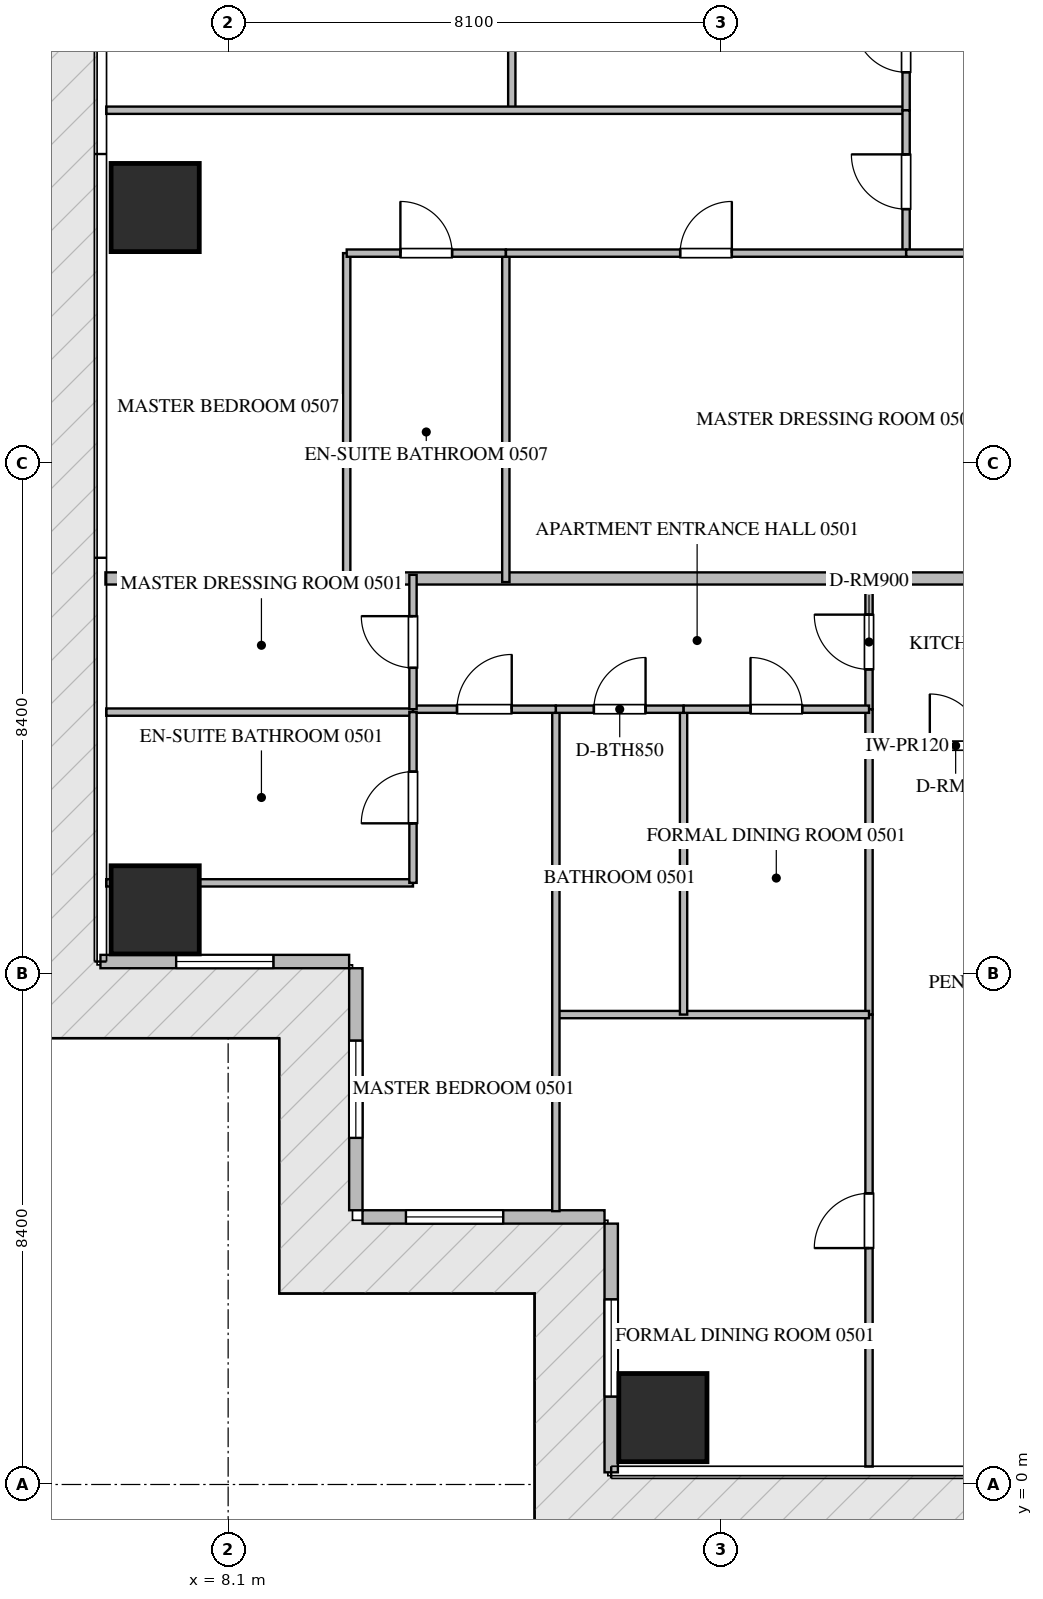
"""IFC4 building model, lengths in metres.
Left out: names, types, materials, properties, quantities, classifications, styles, units other than length and angle.
Written with IfcOpenShell. Run it as: python <this file> out.ifc"""

import sys

from ifc_helpers import new_model, si_unit, direction, frame, frame_2d, origin, origin_2d, place, context, subcontext, project, spatial, rectangle, extrude, source, transform, mapped, element, fill, save


model = new_model("IFC4")
c1 = context("Model", 3, precision=1e-05, world=origin(), true_north=direction((0.0, 1.0)))
c2 = subcontext(c1, "Body", "Model", "MODEL_VIEW")
j1 = project(units=[si_unit("LENGTHUNIT", "METRE"), si_unit("PLANEANGLEUNIT", "RADIAN")], contexts=[c1])
p1 = place(None, origin())
s1 = spatial("IfcSite", under=j1, at=p1, CompositionType="ELEMENT")
p2 = place(p1, origin())
s2 = spatial("IfcBuilding", under=s1, at=p2, CompositionType="ELEMENT")
p3 = place(p2, frame((0.0, 0.0, 26.7)))
s3 = spatial("IfcBuildingStorey", under=s2, at=p3, CompositionType="ELEMENT", Elevation=26.7)
m1 = source(origin(), c2, "Body", "SweptSolid", [
    extrude(rectangle(XDim=1.45, YDim=1.45, at=origin_2d()), origin(), (0.0, 0.0, 1.0), 3.93),
])
for number, where, z_axis, x_axis in (
    (1, (15.25, 1.1, -0.44), (0.0, 0.0, 1.0), (1.0, 0.0, 0.0)),
    (2, (6.9, 9.45, -0.44), (0.0, 0.0, 1.0), (1.0, 0.0, 0.0)),
    (3, (6.9, 21.0, -0.44), (0.0, 0.0, 1.0), (1.0, 0.0, 0.0)),
):
    element("IfcColumn", number, at=place(p3, frame(where, z_axis=z_axis, x_axis=x_axis)), inside=s3, PredefinedType="COLUMN", context=c2, shape_type="MappedRepresentation", body=[
        mapped(m1, transform((0.0, 0.0, 0.0), scale=1.0)),
    ])
p4 = place(p3, frame((6.0, 8.6, 0.0), z_axis=(0.0, 0.0, 1.0), x_axis=(1.0, 0.0, 0.0)))
e4 = element("IfcWall", 4, at=p4, inside=s3, PredefinedType="ELEMENTEDWALL", context=c2, shape_type="SweptSolid", body=[
    extrude(rectangle(XDim=4.09, YDim=0.22, at=frame_2d((2.045, 0.0))), origin(), (0.0, 0.0, 1.0), 3.475),
])
p5 = place(p4, frame((1.245, 0.0, 0.65)))
e5 = element("IfcOpeningElement", 5, at=p5, cuts=e4, PredefinedType="OPENING", context=c2, shape_type="SweptSolid", body=[
    extrude(rectangle(XDim=1.6, YDim=2.1, at=frame_2d((0.8, 1.05))), frame((0.0, 0.12, 0.0), z_axis=(0.0, -1.0, 0.0), x_axis=(1.0, 0.0, 0.0)), (0.0, 0.0, 1.0), 0.24),
])
p6 = place(p3, frame((10.2, 8.49, 0.0), z_axis=(0.0, 0.0, 1.0), x_axis=(0.0, -1.0, 0.0)))
e6 = element("IfcWall", 6, at=p6, inside=s3, PredefinedType="ELEMENTEDWALL", context=c2, shape_type="SweptSolid", body=[
    extrude(rectangle(XDim=3.98, YDim=0.22, at=frame_2d((1.99, 0.0))), origin(), (0.0, 0.0, 1.0), 3.475),
])
p7 = place(p6, frame((1.19, 0.0, 0.65)))
e7 = element("IfcOpeningElement", 7, at=p7, cuts=e6, PredefinedType="OPENING", context=c2, shape_type="SweptSolid", body=[
    extrude(rectangle(XDim=1.6, YDim=2.1, at=frame_2d((0.8, 1.05))), frame((0.0, 0.12, 0.0), z_axis=(0.0, -1.0, 0.0), x_axis=(1.0, 0.0, 0.0)), (0.0, 0.0, 1.0), 0.24),
])
p8 = place(p3, frame((10.31, 4.4, 0.0), z_axis=(0.0, 0.0, 1.0), x_axis=(1.0, 0.0, 0.0)))
e8 = element("IfcWall", 8, at=p8, inside=s3, PredefinedType="ELEMENTEDWALL", context=c2, shape_type="SweptSolid", body=[
    extrude(rectangle(XDim=3.98, YDim=0.22, at=frame_2d((1.99, 0.0))), origin(), (0.0, 0.0, 1.0), 3.475),
])
p9 = place(p8, frame((0.714, 0.0, 0.65)))
e9 = element("IfcOpeningElement", 9, at=p9, cuts=e8, PredefinedType="OPENING", context=c2, shape_type="SweptSolid", body=[
    extrude(rectangle(XDim=1.6, YDim=2.1, at=frame_2d((0.8, 1.05))), frame((0.0, 0.12, 0.0), z_axis=(0.0, -1.0, 0.0), x_axis=(1.0, 0.0, 0.0)), (0.0, 0.0, 1.0), 0.24),
])
p10 = place(p3, frame((14.4, 4.29, 0.0), z_axis=(0.0, 0.0, 1.0), x_axis=(0.0, -1.0, 0.0)))
e10 = element("IfcWall", 10, at=p10, inside=s3, PredefinedType="ELEMENTEDWALL", context=c2, shape_type="SweptSolid", body=[
    extrude(rectangle(XDim=4.09, YDim=0.22, at=frame_2d((2.045, 0.0))), origin(), (0.0, 0.0, 1.0), 3.475),
])
p11 = place(p10, frame((1.245, 0.0, 0.65)))
e11 = element("IfcOpeningElement", 11, at=p11, cuts=e10, PredefinedType="OPENING", context=c2, shape_type="SweptSolid", body=[
    extrude(rectangle(XDim=1.6, YDim=2.1, at=frame_2d((0.8, 1.05))), frame((0.0, 0.12, 0.0), z_axis=(0.0, -1.0, 0.0), x_axis=(1.0, 0.0, 0.0)), (0.0, 0.0, 1.0), 0.24),
])
p12 = place(p3, frame((6.082, 14.9, 0.0), z_axis=(0.0, 0.0, 1.0), x_axis=(1.0, 0.0, 0.0)))
e12 = element("IfcWall", 12, at=p12, inside=s3, PredefinedType="PARTITIONING", context=c2, shape_type="SweptSolid", body=[
    extrude(rectangle(XDim=15.318, YDim=0.2, at=frame_2d((7.659, 0.0))), origin(), (0.0, 0.0, 1.0), 3.49),
])
p13 = place(p3, frame((18.64, 12.15, 0.0), z_axis=(0.0, 0.0, 1.0), x_axis=(1.0, 0.0, 0.0)))
e13 = element("IfcWall", 13, at=p13, inside=s3, PredefinedType="PARTITIONING", context=c2, shape_type="SweptSolid", body=[
    extrude(rectangle(XDim=2.85, YDim=0.12, at=frame_2d((1.425, 0.0))), origin(), (0.0, 0.0, 1.0), 3.49),
])
p14 = place(p13, frame((1.0, 0.0, 0.0)))
e14 = element("IfcOpeningElement", 14, at=p14, cuts=e13, PredefinedType="OPENING", context=c2, shape_type="SweptSolid", body=[
    extrude(rectangle(XDim=0.85, YDim=2.1, at=frame_2d((0.425, 1.05))), frame((0.0, 0.07, 0.0), z_axis=(0.0, -1.0, 0.0), x_axis=(1.0, 0.0, 0.0)), (0.0, 0.0, 1.0), 0.14),
])
p15 = place(p3, frame((18.64, 12.75, 0.0), z_axis=(0.0, 0.0, 1.0), x_axis=(0.0, 1.0, 0.0)))
e15 = element("IfcWall", 15, at=p15, inside=s3, PredefinedType="PARTITIONING", context=c2, shape_type="SweptSolid", body=[
    extrude(rectangle(XDim=2.21, YDim=0.12, at=frame_2d((1.105, 0.0))), origin(), (0.0, 0.0, 1.0), 3.49),
])
p16 = place(p15, frame((0.655, 0.0, 0.0)))
e16 = element("IfcOpeningElement", 16, at=p16, cuts=e15, PredefinedType="OPENING", context=c2, shape_type="SweptSolid", body=[
    extrude(rectangle(XDim=0.9, YDim=2.1, at=frame_2d((0.45, 1.05))), frame((0.0, 0.07, 0.0), z_axis=(0.0, -1.0, 0.0), x_axis=(1.0, 0.0, 0.0)), (0.0, 0.0, 1.0), 0.14),
])
p17 = place(p3, frame((18.64, 0.295, 0.0), z_axis=(0.0, 0.0, 1.0), x_axis=(0.0, 1.0, 0.0)))
e17 = element("IfcWall", 17, at=p17, inside=s3, PredefinedType="PARTITIONING", context=c2, shape_type="SweptSolid", body=[
    extrude(rectangle(XDim=7.433, YDim=0.12, at=frame_2d((3.717, 0.0))), origin(), (0.0, 0.0, 1.0), 3.49),
])
p18 = place(p17, frame((3.593, 0.0, 0.0)))
e18 = element("IfcOpeningElement", 18, at=p18, cuts=e17, PredefinedType="OPENING", context=c2, shape_type="SweptSolid", body=[
    extrude(rectangle(XDim=0.9, YDim=2.1, at=frame_2d((0.45, 1.05))), frame((0.0, 0.07, 0.0), z_axis=(0.0, -1.0, 0.0), x_axis=(1.0, 0.0, 0.0)), (0.0, 0.0, 1.0), 0.14),
])
p19 = place(p3, frame((18.64, 7.73, 0.0), z_axis=(0.0, 0.0, 1.0), x_axis=(0.0, 1.0, 0.0)))
e19 = element("IfcWall", 19, at=p19, inside=s3, PredefinedType="PARTITIONING", context=c2, shape_type="SweptSolid", body=[
    extrude(rectangle(XDim=5.018, YDim=0.12, at=frame_2d((2.509, 0.0))), origin(), (0.0, 0.0, 1.0), 3.49),
])
p20 = place(p3, frame((13.49, 7.728, 0.0), z_axis=(0.0, 0.0, 1.0), x_axis=(1.0, 0.0, 0.0)))
e20 = element("IfcWall", 20, at=p20, inside=s3, PredefinedType="PARTITIONING", context=c2, shape_type="SweptSolid", body=[
    extrude(rectangle(XDim=5.15, YDim=0.12, at=frame_2d((2.575, 0.0))), origin(), (0.0, 0.0, 1.0), 3.49),
])
p21 = place(p3, frame((13.49, 4.495, 0.0), z_axis=(0.0, 0.0, 1.0), x_axis=(0.0, 1.0, 0.0)))
e21 = element("IfcWall", 21, at=p21, inside=s3, PredefinedType="PARTITIONING", context=c2, shape_type="SweptSolid", body=[
    extrude(rectangle(XDim=8.255, YDim=0.12, at=frame_2d((4.127, 0.0))), origin(), (0.0, 0.0, 1.0), 3.49),
])
p22 = place(p3, frame((15.59, 7.728, 0.0), z_axis=(0.0, 0.0, 1.0), x_axis=(0.0, 1.0, 0.0)))
e22 = element("IfcWall", 22, at=p22, inside=s3, PredefinedType="PARTITIONING", context=c2, shape_type="SweptSolid", body=[
    extrude(rectangle(XDim=5.022, YDim=0.12, at=frame_2d((2.511, 0.0))), origin(), (0.0, 0.0, 1.0), 3.49),
])
p23 = place(p3, frame((13.49, 12.75, 0.0), z_axis=(0.0, 0.0, 1.0), x_axis=(1.0, 0.0, 0.0)))
e23 = element("IfcWall", 23, at=p23, inside=s3, PredefinedType="PARTITIONING", context=c2, shape_type="SweptSolid", body=[
    extrude(rectangle(XDim=2.1, YDim=0.12, at=frame_2d((1.05, 0.0))), origin(), (0.0, 0.0, 1.0), 3.49),
])
p24 = place(p23, frame((0.625, 0.0, 0.0)))
e24 = element("IfcOpeningElement", 24, at=p24, cuts=e23, PredefinedType="OPENING", context=c2, shape_type="SweptSolid", body=[
    extrude(rectangle(XDim=0.85, YDim=2.1, at=frame_2d((0.425, 1.05))), frame((0.0, 0.07, 0.0), z_axis=(0.0, -1.0, 0.0), x_axis=(1.0, 0.0, 0.0)), (0.0, 0.0, 1.0), 0.14),
])
p25 = place(p3, frame((15.592, 12.75, 0.0), z_axis=(0.0, 0.0, 1.0), x_axis=(1.0, 0.0, 0.0)))
e25 = element("IfcWall", 25, at=p25, inside=s3, PredefinedType="PARTITIONING", context=c2, shape_type="SweptSolid", body=[
    extrude(rectangle(XDim=3.048, YDim=0.12, at=frame_2d((1.524, 0.0))), origin(), (0.0, 0.0, 1.0), 3.49),
])
p26 = place(p25, frame((1.099, 0.0, 0.0)))
e26 = element("IfcOpeningElement", 26, at=p26, cuts=e25, PredefinedType="OPENING", context=c2, shape_type="SweptSolid", body=[
    extrude(rectangle(XDim=0.85, YDim=2.1, at=frame_2d((0.425, 1.05))), frame((0.0, 0.07, 0.0), z_axis=(0.0, -1.0, 0.0), x_axis=(1.0, 0.0, 0.0)), (0.0, 0.0, 1.0), 0.14),
])
p27 = place(p3, frame((11.14, 12.75, 0.0), z_axis=(0.0, 0.0, 1.0), x_axis=(1.0, 0.0, 0.0)))
e27 = element("IfcWall", 27, at=p27, inside=s3, PredefinedType="PARTITIONING", context=c2, shape_type="SweptSolid", body=[
    extrude(rectangle(XDim=2.348, YDim=0.12, at=frame_2d((1.174, 0.0))), origin(), (0.0, 0.0, 1.0), 3.49),
])
p28 = place(p27, frame((0.724, 0.0, 0.0)))
e28 = element("IfcOpeningElement", 28, at=p28, cuts=e27, PredefinedType="OPENING", context=c2, shape_type="SweptSolid", body=[
    extrude(rectangle(XDim=0.9, YDim=2.1, at=frame_2d((0.45, 1.05))), frame((0.0, 0.07, 0.0), z_axis=(0.0, -1.0, 0.0), x_axis=(1.0, 0.0, 0.0)), (0.0, 0.0, 1.0), 0.14),
])
p29 = place(p3, frame((6.095, 9.894, 0.0), z_axis=(0.0, 0.0, 1.0), x_axis=(1.0, 0.0, 0.0)))
e29 = element("IfcWall", 29, at=p29, inside=s3, PredefinedType="PARTITIONING", context=c2, shape_type="SweptSolid", body=[
    extrude(rectangle(XDim=5.045, YDim=0.12, at=frame_2d((2.522, 0.0))), origin(), (0.0, 0.0, 1.0), 3.49),
])
p30 = place(p3, frame((6.095, 12.702, 0.0), z_axis=(0.0, 0.0, 1.0), x_axis=(1.0, 0.0, 0.0)))
e30 = element("IfcWall", 30, at=p30, inside=s3, PredefinedType="PARTITIONING", context=c2, shape_type="SweptSolid", body=[
    extrude(rectangle(XDim=5.043, YDim=0.12, at=frame_2d((2.521, 0.0))), origin(), (0.0, 0.0, 1.0), 3.49),
])
p31 = place(p3, frame((11.14, 9.894, 0.0), z_axis=(0.0, 0.0, 1.0), x_axis=(0.0, 1.0, 0.0)))
e31 = element("IfcWall", 31, at=p31, inside=s3, PredefinedType="PARTITIONING", context=c2, shape_type="SweptSolid", body=[
    extrude(rectangle(XDim=2.808, YDim=0.12, at=frame_2d((1.404, 0.0))), origin(), (0.0, 0.0, 1.0), 3.49),
])
p32 = place(p31, frame((0.979, 0.0, 0.0)))
e32 = element("IfcOpeningElement", 32, at=p32, cuts=e31, PredefinedType="OPENING", context=c2, shape_type="SweptSolid", body=[
    extrude(rectangle(XDim=0.85, YDim=2.1, at=frame_2d((0.425, 1.05))), frame((0.0, 0.07, 0.0), z_axis=(0.0, -1.0, 0.0), x_axis=(1.0, 0.0, 0.0)), (0.0, 0.0, 1.0), 0.14),
])
p33 = place(p3, frame((11.14, 12.75, 0.0), z_axis=(0.0, 0.0, 1.0), x_axis=(0.0, 1.0, 0.0)))
e33 = element("IfcWall", 33, at=p33, inside=s3, PredefinedType="PARTITIONING", context=c2, shape_type="SweptSolid", body=[
    extrude(rectangle(XDim=2.21, YDim=0.12, at=frame_2d((1.105, 0.0))), origin(), (0.0, 0.0, 1.0), 3.49),
])
p34 = place(p33, frame((0.68, 0.0, 0.0)))
e34 = element("IfcOpeningElement", 34, at=p34, cuts=e33, PredefinedType="OPENING", context=c2, shape_type="SweptSolid", body=[
    extrude(rectangle(XDim=0.85, YDim=2.1, at=frame_2d((0.425, 1.05))), frame((0.0, 0.07, 0.0), z_axis=(0.0, -1.0, 0.0), x_axis=(1.0, 0.0, 0.0)), (0.0, 0.0, 1.0), 0.14),
])
p35 = place(p3, frame((12.765, 22.6, 0.0), z_axis=(0.0, 0.0, 1.0), x_axis=(0.0, 1.0, 0.0)))
e35 = element("IfcWall", 35, at=p35, inside=s3, PredefinedType="PARTITIONING", context=c2, shape_type="SweptSolid", body=[
    extrude(rectangle(XDim=5.07, YDim=0.12, at=frame_2d((2.535, 0.0))), origin(), (0.0, 0.0, 1.0), 3.49),
])
p36 = place(p3, frame((6.095, 22.6, 0.0), z_axis=(0.0, 0.0, 1.0), x_axis=(1.0, 0.0, 0.0)))
e36 = element("IfcWall", 36, at=p36, inside=s3, PredefinedType="PARTITIONING", context=c2, shape_type="SweptSolid", body=[
    extrude(rectangle(XDim=13.155, YDim=0.12, at=frame_2d((6.578, 0.0))), origin(), (0.0, 0.0, 1.0), 3.49),
])
p37 = place(p3, frame((19.25, 22.6, 0.0), z_axis=(0.0, 0.0, 1.0), x_axis=(0.0, 1.0, 0.0)))
e37 = element("IfcWall", 37, at=p37, inside=s3, PredefinedType="PARTITIONING", context=c2, shape_type="SweptSolid", body=[
    extrude(rectangle(XDim=2.1, YDim=0.12, at=frame_2d((1.05, 0.0))), origin(), (0.0, 0.0, 1.0), 3.49),
])
p38 = place(p37, frame((0.625, 0.0, 0.0)))
e38 = element("IfcOpeningElement", 38, at=p38, cuts=e37, PredefinedType="OPENING", context=c2, shape_type="SweptSolid", body=[
    extrude(rectangle(XDim=0.85, YDim=2.1, at=frame_2d((0.425, 1.05))), frame((0.0, 0.07, 0.0), z_axis=(0.0, -1.0, 0.0), x_axis=(1.0, 0.0, 0.0)), (0.0, 0.0, 1.0), 0.14),
])
p39 = place(p3, frame((19.25, 20.25, 0.0), z_axis=(0.0, 0.0, 1.0), x_axis=(0.0, 1.0, 0.0)))
e39 = element("IfcWall", 39, at=p39, inside=s3, PredefinedType="PARTITIONING", context=c2, shape_type="SweptSolid", body=[
    extrude(rectangle(XDim=2.348, YDim=0.12, at=frame_2d((1.174, 0.0))), origin(), (0.0, 0.0, 1.0), 3.49),
])
p40 = place(p39, frame((0.724, 0.0, 0.0)))
e40 = element("IfcOpeningElement", 40, at=p40, cuts=e39, PredefinedType="OPENING", context=c2, shape_type="SweptSolid", body=[
    extrude(rectangle(XDim=0.9, YDim=2.1, at=frame_2d((0.45, 1.05))), frame((0.0, 0.07, 0.0), z_axis=(0.0, -1.0, 0.0), x_axis=(1.0, 0.0, 0.0)), (0.0, 0.0, 1.0), 0.14),
])
for number, where, z_axis, x_axis in (
    (41, (10.05, 14.84, 0.0), (0.0, 0.0, 1.0), (0.0, 1.0, 0.0)),
    (42, (12.667, 14.84, 0.0), (0.0, 0.0, 1.0), (0.0, 1.0, 0.0)),
):
    element("IfcWall", number, at=place(p3, frame(where, z_axis=z_axis, x_axis=x_axis)), inside=s3, PredefinedType="PARTITIONING", context=c2, shape_type="SweptSolid", body=[
        extrude(rectangle(XDim=5.41, YDim=0.12, at=frame_2d((2.705, 0.0))), origin(), (0.0, 0.0, 1.0), 3.49),
    ])
p41 = place(p3, frame((10.05, 20.25, 0.0), z_axis=(0.0, 0.0, 1.0), x_axis=(1.0, 0.0, 0.0)))
e43 = element("IfcWall", 43, at=p41, inside=s3, PredefinedType="PARTITIONING", context=c2, shape_type="SweptSolid", body=[
    extrude(rectangle(XDim=2.617, YDim=0.12, at=frame_2d((1.309, 0.0))), origin(), (0.0, 0.0, 1.0), 3.49),
])
p42 = place(p41, frame((0.883, 0.0, 0.0)))
e44 = element("IfcOpeningElement", 44, at=p42, cuts=e43, PredefinedType="OPENING", context=c2, shape_type="SweptSolid", body=[
    extrude(rectangle(XDim=0.85, YDim=2.1, at=frame_2d((0.425, 1.05))), frame((0.0, 0.07, 0.0), z_axis=(0.0, -1.0, 0.0), x_axis=(1.0, 0.0, 0.0)), (0.0, 0.0, 1.0), 0.14),
])
p43 = place(p3, frame((12.669, 20.25, 0.0), z_axis=(0.0, 0.0, 1.0), x_axis=(1.0, 0.0, 0.0)))
e45 = element("IfcWall", 45, at=p43, inside=s3, PredefinedType="PARTITIONING", context=c2, shape_type="SweptSolid", body=[
    extrude(rectangle(XDim=6.581, YDim=0.12, at=frame_2d((3.291, 0.0))), origin(), (0.0, 0.0, 1.0), 3.49),
])
p44 = place(p43, frame((2.865, 0.0, 0.0)))
e46 = element("IfcOpeningElement", 46, at=p44, cuts=e45, PredefinedType="OPENING", context=c2, shape_type="SweptSolid", body=[
    extrude(rectangle(XDim=0.85, YDim=2.1, at=frame_2d((0.425, 1.05))), frame((0.0, 0.07, 0.0), z_axis=(0.0, -1.0, 0.0), x_axis=(1.0, 0.0, 0.0)), (0.0, 0.0, 1.0), 0.14),
])
p45 = place(p3, frame((19.252, 20.25, 0.0), z_axis=(0.0, 0.0, 1.0), x_axis=(1.0, 0.0, 0.0)))
e47 = element("IfcWall", 47, at=p45, inside=s3, PredefinedType="PARTITIONING", context=c2, shape_type="SweptSolid", body=[
    extrude(rectangle(XDim=2.208, YDim=0.12, at=frame_2d((1.104, 0.0))), origin(), (0.0, 0.0, 1.0), 3.49),
])
m2 = source(origin(), c2, "Body", "SweptSolid", [
    extrude(rectangle(XDim=1.6, YDim=2.1, at=frame_2d((0.8, 1.05))), frame((0.0, 0.03, 0.0), z_axis=(0.0, -1.0, 0.0), x_axis=(1.0, 0.0, 0.0)), (0.0, 0.0, 1.0), 0.06),
])
p46 = place(p5, origin())
e48 = element("IfcWindow", 48, at=p46, inside=s3, PartitioningType="SINGLE_PANEL", PredefinedType="WINDOW", context=c2, shape_type="MappedRepresentation", body=[
    mapped(m2, transform((0.0, 0.0, 0.0), scale=1.0)),
])
fill(e5, e48)
p47 = place(p7, origin())
e49 = element("IfcWindow", 49, at=p47, inside=s3, PartitioningType="SINGLE_PANEL", PredefinedType="WINDOW", context=c2, shape_type="MappedRepresentation", body=[
    mapped(m2, transform((0.0, 0.0, 0.0), scale=1.0)),
])
fill(e7, e49)
p48 = place(p9, origin())
e50 = element("IfcWindow", 50, at=p48, inside=s3, PartitioningType="SINGLE_PANEL", PredefinedType="WINDOW", context=c2, shape_type="MappedRepresentation", body=[
    mapped(m2, transform((0.0, 0.0, 0.0), scale=1.0)),
])
fill(e9, e50)
p49 = place(p11, origin())
e51 = element("IfcWindow", 51, at=p49, inside=s3, PartitioningType="SINGLE_PANEL", PredefinedType="WINDOW", context=c2, shape_type="MappedRepresentation", body=[
    mapped(m2, transform((0.0, 0.0, 0.0), scale=1.0)),
])
fill(e11, e51)
m3 = source(origin(), c2, "Body", "SweptSolid", [
    extrude(rectangle(XDim=0.85, YDim=2.1, at=frame_2d((0.425, 1.05))), frame((0.0, 0.025, 0.0), z_axis=(0.0, -1.0, 0.0), x_axis=(1.0, 0.0, 0.0)), (0.0, 0.0, 1.0), 0.05),
])
p50 = place(p14, origin())
e52 = element("IfcDoor", 52, at=p50, inside=s3, OperationType="SINGLE_SWING_LEFT", PredefinedType="DOOR", context=c2, shape_type="MappedRepresentation", body=[
    mapped(m3, transform((0.0, 0.0, 0.0), scale=1.0)),
])
fill(e14, e52)
m4 = source(origin(), c2, "Body", "SweptSolid", [
    extrude(rectangle(XDim=0.9, YDim=2.1, at=frame_2d((0.45, 1.05))), frame((0.0, 0.025, 0.0), z_axis=(0.0, -1.0, 0.0), x_axis=(1.0, 0.0, 0.0)), (0.0, 0.0, 1.0), 0.05),
])
p51 = place(p16, origin())
e53 = element("IfcDoor", 53, at=p51, inside=s3, OperationType="SINGLE_SWING_RIGHT", PredefinedType="DOOR", context=c2, shape_type="MappedRepresentation", body=[
    mapped(m4, transform((0.0, 0.0, 0.0), scale=1.0)),
])
fill(e16, e53)
p52 = place(p18, origin())
e54 = element("IfcDoor", 54, at=p52, inside=s3, OperationType="SINGLE_SWING_LEFT", PredefinedType="DOOR", context=c2, shape_type="MappedRepresentation", body=[
    mapped(m4, transform((0.0, 0.0, 0.0), scale=1.0)),
])
fill(e18, e54)
p53 = place(p24, origin())
e55 = element("IfcDoor", 55, at=p53, inside=s3, OperationType="SINGLE_SWING_RIGHT", PredefinedType="DOOR", context=c2, shape_type="MappedRepresentation", body=[
    mapped(m3, transform((0.0, 0.0, 0.0), scale=1.0)),
])
fill(e24, e55)
p54 = place(p26, origin())
e56 = element("IfcDoor", 56, at=p54, inside=s3, OperationType="SINGLE_SWING_LEFT", PredefinedType="DOOR", context=c2, shape_type="MappedRepresentation", body=[
    mapped(m3, transform((0.0, 0.0, 0.0), scale=1.0)),
])
fill(e26, e56)
p55 = place(p28, origin())
e57 = element("IfcDoor", 57, at=p55, inside=s3, OperationType="SINGLE_SWING_RIGHT", PredefinedType="DOOR", context=c2, shape_type="MappedRepresentation", body=[
    mapped(m4, transform((0.0, 0.0, 0.0), scale=1.0)),
])
fill(e28, e57)
p56 = place(p32, origin())
e58 = element("IfcDoor", 58, at=p56, inside=s3, OperationType="SINGLE_SWING_LEFT", PredefinedType="DOOR", context=c2, shape_type="MappedRepresentation", body=[
    mapped(m3, transform((0.0, 0.0, 0.0), scale=1.0)),
])
fill(e32, e58)
p57 = place(p34, origin())
e59 = element("IfcDoor", 59, at=p57, inside=s3, OperationType="SINGLE_SWING_RIGHT", PredefinedType="DOOR", context=c2, shape_type="MappedRepresentation", body=[
    mapped(m3, transform((0.0, 0.0, 0.0), scale=1.0)),
])
fill(e34, e59)
p58 = place(p38, origin())
e60 = element("IfcDoor", 60, at=p58, inside=s3, OperationType="SINGLE_SWING_RIGHT", PredefinedType="DOOR", context=c2, shape_type="MappedRepresentation", body=[
    mapped(m3, transform((0.0, 0.0, 0.0), scale=1.0)),
])
fill(e38, e60)
p59 = place(p40, origin())
e61 = element("IfcDoor", 61, at=p59, inside=s3, OperationType="SINGLE_SWING_RIGHT", PredefinedType="DOOR", context=c2, shape_type="MappedRepresentation", body=[
    mapped(m4, transform((0.0, 0.0, 0.0), scale=1.0)),
])
fill(e40, e61)
p60 = place(p42, origin())
e62 = element("IfcDoor", 62, at=p60, inside=s3, OperationType="SINGLE_SWING_LEFT", PredefinedType="DOOR", context=c2, shape_type="MappedRepresentation", body=[
    mapped(m3, transform((0.0, 0.0, 0.0), scale=1.0)),
])
fill(e44, e62)
p61 = place(p44, origin())
e63 = element("IfcDoor", 63, at=p61, inside=s3, OperationType="SINGLE_SWING_RIGHT", PredefinedType="DOOR", context=c2, shape_type="MappedRepresentation", body=[
    mapped(m3, transform((0.0, 0.0, 0.0), scale=1.0)),
])
fill(e46, e63)
save(model, sys.argv[1])
